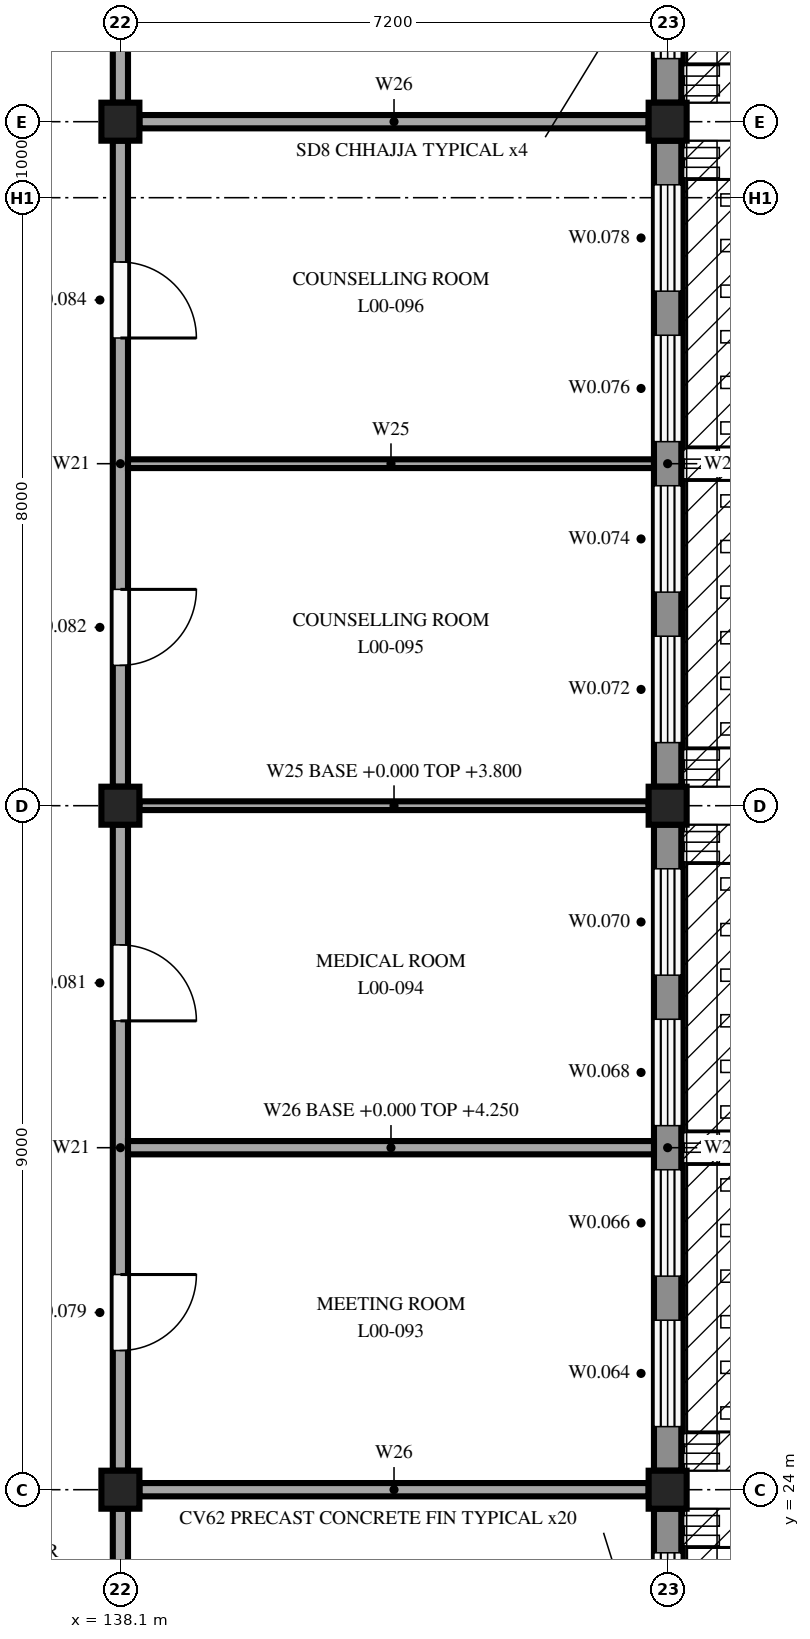
"""IFC4 building model, lengths in metres.
Left out: names, types, materials, properties, quantities, classifications, styles, units other than length and angle.
Written with IfcOpenShell. Run it as: python <this file> out.ifc"""

import sys

from ifc_helpers import new_model, si_unit, direction, frame, frame_2d, origin, origin_2d, place, context, subcontext, project, spatial, rectangle, extrude, element, fill, save


model = new_model("IFC4")
c1 = context("Model", 3, precision=1e-05, world=origin(), true_north=direction((0.0, 1.0)))
c2 = subcontext(c1, "Body", "Model", "MODEL_VIEW")
j1 = project(units=[si_unit("LENGTHUNIT", "METRE"), si_unit("PLANEANGLEUNIT", "RADIAN")], contexts=[c1])
p1 = place(None, origin())
s1 = spatial("IfcSite", under=j1, at=p1, CompositionType="ELEMENT")
p2 = place(p1, origin())
s2 = spatial("IfcBuilding", under=s1, at=p2, CompositionType="ELEMENT")
p3 = place(p2, origin())
s3 = spatial("IfcBuildingStorey", under=s2, at=p3, CompositionType="ELEMENT", Elevation=0.0)
for number, where, z_axis, x_axis in (
    (1, (138.1, 24.0, 0.0), (0.0, 0.0, 1.0), (1.0, 0.0, 0.0)),
    (2, (138.1, 33.0, 0.0), (0.0, 0.0, 1.0), (1.0, 0.0, 0.0)),
    (3, (138.1, 42.0, 0.0), (0.0, 0.0, 1.0), (1.0, 0.0, 0.0)),
    (4, (145.3, 24.0, 0.0), (0.0, 0.0, 1.0), (1.0, 0.0, 0.0)),
    (5, (145.3, 33.0, 0.0), (0.0, 0.0, 1.0), (1.0, 0.0, 0.0)),
    (6, (145.3, 42.0, 0.0), (0.0, 0.0, 1.0), (1.0, 0.0, 0.0)),
):
    element("IfcColumn", number, at=place(p3, frame(where, z_axis=z_axis, x_axis=x_axis)), inside=s3, PredefinedType="COLUMN", context=c2, shape_type="SweptSolid", body=[
        extrude(rectangle(XDim=0.5, YDim=0.5, at=origin_2d()), origin(), (0.0, 0.0, 1.0), 4.25),
    ])
p4 = place(p3, frame((145.3, 23.75, 0.0), z_axis=(0.0, 0.0, 1.0), x_axis=(0.0, -1.0, 0.0)))
e7 = element("IfcWall", 7, at=p4, inside=s3, PredefinedType="STANDARD", context=c2, shape_type="SweptSolid", body=[
    extrude(rectangle(XDim=8.5, YDim=0.36, at=frame_2d((4.25, 0.0))), origin(), (0.0, 0.0, 1.0), 3.75),
])
p5 = place(p4, frame((6.52, 0.0, 0.9)))
e8 = element("IfcOpeningElement", 8, at=p5, cuts=e7, PredefinedType="OPENING", context=c2, shape_type="SweptSolid", body=[
    extrude(rectangle(XDim=1.4, YDim=2.7, at=frame_2d((0.7, 1.35))), frame((0.0, 0.19, 0.0), z_axis=(0.0, -1.0, 0.0), x_axis=(1.0, 0.0, 0.0)), (0.0, 0.0, 1.0), 0.38),
])
p6 = place(p4, frame((4.54, 0.0, 0.9)))
e9 = element("IfcOpeningElement", 9, at=p6, cuts=e7, PredefinedType="OPENING", context=c2, shape_type="SweptSolid", body=[
    extrude(rectangle(XDim=1.4, YDim=2.7, at=frame_2d((0.7, 1.35))), frame((0.0, 0.19, 0.0), z_axis=(0.0, -1.0, 0.0), x_axis=(1.0, 0.0, 0.0)), (0.0, 0.0, 1.0), 0.38),
])
p7 = place(p4, frame((2.56, 0.0, 0.9)))
e10 = element("IfcOpeningElement", 10, at=p7, cuts=e7, PredefinedType="OPENING", context=c2, shape_type="SweptSolid", body=[
    extrude(rectangle(XDim=1.4, YDim=2.7, at=frame_2d((0.7, 1.35))), frame((0.0, 0.19, 0.0), z_axis=(0.0, -1.0, 0.0), x_axis=(1.0, 0.0, 0.0)), (0.0, 0.0, 1.0), 0.38),
])
p8 = place(p4, frame((0.58, 0.0, 0.9)))
e11 = element("IfcOpeningElement", 11, at=p8, cuts=e7, PredefinedType="OPENING", context=c2, shape_type="SweptSolid", body=[
    extrude(rectangle(XDim=1.4, YDim=2.7, at=frame_2d((0.7, 1.35))), frame((0.0, 0.19, 0.0), z_axis=(0.0, -1.0, 0.0), x_axis=(1.0, 0.0, 0.0)), (0.0, 0.0, 1.0), 0.38),
])
p9 = place(p3, frame((145.3, 32.75, 0.0), z_axis=(0.0, 0.0, 1.0), x_axis=(0.0, -1.0, 0.0)))
e12 = element("IfcWall", 12, at=p9, inside=s3, PredefinedType="STANDARD", context=c2, shape_type="SweptSolid", body=[
    extrude(rectangle(XDim=8.5, YDim=0.36, at=frame_2d((4.25, 0.0))), origin(), (0.0, 0.0, 1.0), 3.75),
])
p10 = place(p9, frame((6.52, 0.0, 0.9)))
e13 = element("IfcOpeningElement", 13, at=p10, cuts=e12, PredefinedType="OPENING", context=c2, shape_type="SweptSolid", body=[
    extrude(rectangle(XDim=1.4, YDim=2.7, at=frame_2d((0.7, 1.35))), frame((0.0, 0.19, 0.0), z_axis=(0.0, -1.0, 0.0), x_axis=(1.0, 0.0, 0.0)), (0.0, 0.0, 1.0), 0.38),
])
p11 = place(p9, frame((4.54, 0.0, 0.9)))
e14 = element("IfcOpeningElement", 14, at=p11, cuts=e12, PredefinedType="OPENING", context=c2, shape_type="SweptSolid", body=[
    extrude(rectangle(XDim=1.4, YDim=2.7, at=frame_2d((0.7, 1.35))), frame((0.0, 0.19, 0.0), z_axis=(0.0, -1.0, 0.0), x_axis=(1.0, 0.0, 0.0)), (0.0, 0.0, 1.0), 0.38),
])
p12 = place(p9, frame((2.56, 0.0, 0.6)))
e15 = element("IfcOpeningElement", 15, at=p12, cuts=e12, PredefinedType="OPENING", context=c2, shape_type="SweptSolid", body=[
    extrude(rectangle(XDim=1.4, YDim=3.0, at=frame_2d((0.7, 1.5))), frame((0.0, 0.19, 0.0), z_axis=(0.0, -1.0, 0.0), x_axis=(1.0, 0.0, 0.0)), (0.0, 0.0, 1.0), 0.38),
])
p13 = place(p9, frame((0.58, 0.0, 0.6)))
e16 = element("IfcOpeningElement", 16, at=p13, cuts=e12, PredefinedType="OPENING", context=c2, shape_type="SweptSolid", body=[
    extrude(rectangle(XDim=1.4, YDim=3.0, at=frame_2d((0.7, 1.5))), frame((0.0, 0.19, 0.0), z_axis=(0.0, -1.0, 0.0), x_axis=(1.0, 0.0, 0.0)), (0.0, 0.0, 1.0), 0.38),
])
p14 = place(p3, frame((145.3, 41.75, 0.0), z_axis=(0.0, 0.0, 1.0), x_axis=(0.0, -1.0, 0.0)))
e17 = element("IfcWall", 17, at=p14, inside=s3, PredefinedType="STANDARD", context=c2, shape_type="SweptSolid", body=[
    extrude(rectangle(XDim=8.5, YDim=0.36, at=frame_2d((4.25, 0.0))), origin(), (0.0, 0.0, 1.0), 3.75),
])
p15 = place(p14, frame((6.52, 0.0, 0.9)))
e18 = element("IfcOpeningElement", 18, at=p15, cuts=e17, PredefinedType="OPENING", context=c2, shape_type="SweptSolid", body=[
    extrude(rectangle(XDim=1.4, YDim=2.7, at=frame_2d((0.7, 1.35))), frame((0.0, 0.19, 0.0), z_axis=(0.0, -1.0, 0.0), x_axis=(1.0, 0.0, 0.0)), (0.0, 0.0, 1.0), 0.38),
])
p16 = place(p14, frame((4.54, 0.0, 0.9)))
e19 = element("IfcOpeningElement", 19, at=p16, cuts=e17, PredefinedType="OPENING", context=c2, shape_type="SweptSolid", body=[
    extrude(rectangle(XDim=1.4, YDim=2.7, at=frame_2d((0.7, 1.35))), frame((0.0, 0.19, 0.0), z_axis=(0.0, -1.0, 0.0), x_axis=(1.0, 0.0, 0.0)), (0.0, 0.0, 1.0), 0.38),
])
p17 = place(p14, frame((2.56, 0.0, 0.9)))
e20 = element("IfcOpeningElement", 20, at=p17, cuts=e17, PredefinedType="OPENING", context=c2, shape_type="SweptSolid", body=[
    extrude(rectangle(XDim=1.4, YDim=2.7, at=frame_2d((0.7, 1.35))), frame((0.0, 0.19, 0.0), z_axis=(0.0, -1.0, 0.0), x_axis=(1.0, 0.0, 0.0)), (0.0, 0.0, 1.0), 0.38),
])
p18 = place(p14, frame((0.58, 0.0, 0.9)))
e21 = element("IfcOpeningElement", 21, at=p18, cuts=e17, PredefinedType="OPENING", context=c2, shape_type="SweptSolid", body=[
    extrude(rectangle(XDim=1.4, YDim=2.7, at=frame_2d((0.7, 1.35))), frame((0.0, 0.19, 0.0), z_axis=(0.0, -1.0, 0.0), x_axis=(1.0, 0.0, 0.0)), (0.0, 0.0, 1.0), 0.38),
])
p19 = place(p3, frame((145.3, 50.75, 0.0), z_axis=(0.0, 0.0, 1.0), x_axis=(0.0, -1.0, 0.0)))
e22 = element("IfcWall", 22, at=p19, inside=s3, PredefinedType="STANDARD", context=c2, shape_type="SweptSolid", body=[
    extrude(rectangle(XDim=8.5, YDim=0.36, at=frame_2d((4.25, 0.0))), origin(), (0.0, 0.0, 1.0), 3.75),
])
p20 = place(p19, frame((6.52, 0.0, 0.6)))
e23 = element("IfcOpeningElement", 23, at=p20, cuts=e22, PredefinedType="OPENING", context=c2, shape_type="SweptSolid", body=[
    extrude(rectangle(XDim=1.4, YDim=3.0, at=frame_2d((0.7, 1.5))), frame((0.0, 0.19, 0.0), z_axis=(0.0, -1.0, 0.0), x_axis=(1.0, 0.0, 0.0)), (0.0, 0.0, 1.0), 0.38),
])
p21 = place(p19, frame((4.54, 0.0, 0.6)))
e24 = element("IfcOpeningElement", 24, at=p21, cuts=e22, PredefinedType="OPENING", context=c2, shape_type="SweptSolid", body=[
    extrude(rectangle(XDim=1.4, YDim=3.0, at=frame_2d((0.7, 1.5))), frame((0.0, 0.19, 0.0), z_axis=(0.0, -1.0, 0.0), x_axis=(1.0, 0.0, 0.0)), (0.0, 0.0, 1.0), 0.38),
])
p22 = place(p19, frame((2.56, 0.0, 0.6)))
e25 = element("IfcOpeningElement", 25, at=p22, cuts=e22, PredefinedType="OPENING", context=c2, shape_type="SweptSolid", body=[
    extrude(rectangle(XDim=1.4, YDim=3.0, at=frame_2d((0.7, 1.5))), frame((0.0, 0.19, 0.0), z_axis=(0.0, -1.0, 0.0), x_axis=(1.0, 0.0, 0.0)), (0.0, 0.0, 1.0), 0.38),
])
p23 = place(p19, frame((0.58, 0.0, 0.6)))
e26 = element("IfcOpeningElement", 26, at=p23, cuts=e22, PredefinedType="OPENING", context=c2, shape_type="SweptSolid", body=[
    extrude(rectangle(XDim=1.4, YDim=3.0, at=frame_2d((0.7, 1.5))), frame((0.0, 0.19, 0.0), z_axis=(0.0, -1.0, 0.0), x_axis=(1.0, 0.0, 0.0)), (0.0, 0.0, 1.0), 0.38),
])
p24 = place(p3, frame((138.1, 23.75, 0.0), z_axis=(0.0, 0.0, 1.0), x_axis=(0.0, -1.0, 0.0)))
e27 = element("IfcWall", 27, at=p24, inside=s3, PredefinedType="PARTITIONING", context=c2, shape_type="SweptSolid", body=[
    extrude(rectangle(XDim=8.5, YDim=0.2, at=frame_2d((4.25, 0.0))), origin(), (0.0, 0.0, 1.0), 3.8),
])
p25 = place(p24, frame((3.75, 0.0, 0.0)))
e28 = element("IfcOpeningElement", 28, at=p25, cuts=e27, PredefinedType="OPENING", context=c2, shape_type="SweptSolid", body=[
    extrude(rectangle(XDim=1.0, YDim=2.1, at=frame_2d((0.5, 1.05))), frame((0.0, 0.11, 0.0), z_axis=(0.0, -1.0, 0.0), x_axis=(1.0, 0.0, 0.0)), (0.0, 0.0, 1.0), 0.22),
])
p26 = place(p3, frame((138.1, 32.75, 0.0), z_axis=(0.0, 0.0, 1.0), x_axis=(0.0, -1.0, 0.0)))
e29 = element("IfcWall", 29, at=p26, inside=s3, PredefinedType="PARTITIONING", context=c2, shape_type="SweptSolid", body=[
    extrude(rectangle(XDim=8.5, YDim=0.2, at=frame_2d((4.25, 0.0))), origin(), (0.0, 0.0, 1.0), 3.8),
])
p27 = place(p26, frame((5.919, 0.0, 0.0)))
e30 = element("IfcOpeningElement", 30, at=p27, cuts=e29, PredefinedType="OPENING", context=c2, shape_type="SweptSolid", body=[
    extrude(rectangle(XDim=1.0, YDim=2.1, at=frame_2d((0.5, 1.05))), frame((0.0, 0.11, 0.0), z_axis=(0.0, -1.0, 0.0), x_axis=(1.0, 0.0, 0.0)), (0.0, 0.0, 1.0), 0.22),
])
p28 = place(p26, frame((1.581, 0.0, 0.0)))
e31 = element("IfcOpeningElement", 31, at=p28, cuts=e29, PredefinedType="OPENING", context=c2, shape_type="SweptSolid", body=[
    extrude(rectangle(XDim=1.0, YDim=2.1, at=frame_2d((0.5, 1.05))), frame((0.0, 0.11, 0.0), z_axis=(0.0, -1.0, 0.0), x_axis=(1.0, 0.0, 0.0)), (0.0, 0.0, 1.0), 0.22),
])
p29 = place(p3, frame((138.1, 41.75, 0.0), z_axis=(0.0, 0.0, 1.0), x_axis=(0.0, -1.0, 0.0)))
e32 = element("IfcWall", 32, at=p29, inside=s3, PredefinedType="PARTITIONING", context=c2, shape_type="SweptSolid", body=[
    extrude(rectangle(XDim=8.5, YDim=0.2, at=frame_2d((4.25, 0.0))), origin(), (0.0, 0.0, 1.0), 3.8),
])
p30 = place(p29, frame((5.904, 0.0, 0.0)))
e33 = element("IfcOpeningElement", 33, at=p30, cuts=e32, PredefinedType="OPENING", context=c2, shape_type="SweptSolid", body=[
    extrude(rectangle(XDim=1.0, YDim=2.1, at=frame_2d((0.5, 1.05))), frame((0.0, 0.11, 0.0), z_axis=(0.0, -1.0, 0.0), x_axis=(1.0, 0.0, 0.0)), (0.0, 0.0, 1.0), 0.22),
])
p31 = place(p29, frame((1.596, 0.0, 0.0)))
e34 = element("IfcOpeningElement", 34, at=p31, cuts=e32, PredefinedType="OPENING", context=c2, shape_type="SweptSolid", body=[
    extrude(rectangle(XDim=1.0, YDim=2.1, at=frame_2d((0.5, 1.05))), frame((0.0, 0.11, 0.0), z_axis=(0.0, -1.0, 0.0), x_axis=(1.0, 0.0, 0.0)), (0.0, 0.0, 1.0), 0.22),
])
p32 = place(p3, frame((138.1, 50.75, 0.0), z_axis=(0.0, 0.0, 1.0), x_axis=(0.0, -1.0, 0.0)))
e35 = element("IfcWall", 35, at=p32, inside=s3, PredefinedType="PARTITIONING", context=c2, shape_type="SweptSolid", body=[
    extrude(rectangle(XDim=8.5, YDim=0.2, at=frame_2d((4.25, 0.0))), origin(), (0.0, 0.0, 1.0), 3.8),
])
p33 = place(p32, frame((3.75, 0.0, 0.0)))
e36 = element("IfcOpeningElement", 36, at=p33, cuts=e35, PredefinedType="OPENING", context=c2, shape_type="SweptSolid", body=[
    extrude(rectangle(XDim=1.0, YDim=2.1, at=frame_2d((0.5, 1.05))), frame((0.0, 0.11, 0.0), z_axis=(0.0, -1.0, 0.0), x_axis=(1.0, 0.0, 0.0)), (0.0, 0.0, 1.0), 0.22),
])
p34 = place(p3, frame((138.35, 24.0, 0.0), z_axis=(0.0, 0.0, 1.0), x_axis=(1.0, 0.0, 0.0)))
e37 = element("IfcWall", 37, at=p34, inside=s3, PredefinedType="PARTITIONING", context=c2, shape_type="SweptSolid", body=[
    extrude(rectangle(XDim=6.7, YDim=0.175, at=frame_2d((3.35, 0.0))), origin(), (0.0, 0.0, 1.0), 3.8),
])
p35 = place(p3, frame((138.2, 28.5, 0.0), z_axis=(0.0, 0.0, 1.0), x_axis=(1.0, 0.0, 0.0)))
e38 = element("IfcWall", 38, at=p35, inside=s3, PredefinedType="PARTITIONING", context=c2, shape_type="SweptSolid", body=[
    extrude(rectangle(XDim=6.92, YDim=0.175, at=frame_2d((3.46, 0.0))), origin(), (0.0, 0.0, 1.0), 4.25),
])
p36 = place(p3, frame((138.35, 33.0, 0.0), z_axis=(0.0, 0.0, 1.0), x_axis=(1.0, 0.0, 0.0)))
e39 = element("IfcWall", 39, at=p36, inside=s3, PredefinedType="PARTITIONING", context=c2, shape_type="SweptSolid", body=[
    extrude(rectangle(XDim=6.7, YDim=0.115, at=frame_2d((3.35, 0.0))), origin(), (0.0, 0.0, 1.0), 3.8),
])
p37 = place(p3, frame((138.2, 37.5, 0.0), z_axis=(0.0, 0.0, 1.0), x_axis=(1.0, 0.0, 0.0)))
e40 = element("IfcWall", 40, at=p37, inside=s3, PredefinedType="PARTITIONING", context=c2, shape_type="SweptSolid", body=[
    extrude(rectangle(XDim=6.92, YDim=0.115, at=frame_2d((3.46, 0.0))), origin(), (0.0, 0.0, 1.0), 4.25),
])
p38 = place(p3, frame((138.35, 42.0, 0.0), z_axis=(0.0, 0.0, 1.0), x_axis=(1.0, 0.0, 0.0)))
e41 = element("IfcWall", 41, at=p38, inside=s3, PredefinedType="PARTITIONING", context=c2, shape_type="SweptSolid", body=[
    extrude(rectangle(XDim=6.7, YDim=0.175, at=frame_2d((3.35, 0.0))), origin(), (0.0, 0.0, 1.0), 3.8),
])
p39 = place(p8, origin())
e42 = element("IfcWindow", 42, at=p39, inside=s3, PartitioningType="DOUBLE_PANEL_VERTICAL", PredefinedType="WINDOW", context=c2, shape_type="SweptSolid", body=[
    extrude(rectangle(XDim=1.4, YDim=2.7, at=frame_2d((0.7, 1.35))), frame((0.0, 0.03, 0.0), z_axis=(0.0, -1.0, 0.0), x_axis=(1.0, 0.0, 0.0)), (0.0, 0.0, 1.0), 0.06),
])
fill(e11, e42)
p40 = place(p10, origin())
e43 = element("IfcWindow", 43, at=p40, inside=s3, PartitioningType="DOUBLE_PANEL_VERTICAL", PredefinedType="WINDOW", context=c2, shape_type="SweptSolid", body=[
    extrude(rectangle(XDim=1.4, YDim=2.7, at=frame_2d((0.7, 1.35))), frame((0.0, 0.03, 0.0), z_axis=(0.0, -1.0, 0.0), x_axis=(1.0, 0.0, 0.0)), (0.0, 0.0, 1.0), 0.06),
])
fill(e13, e43)
p41 = place(p11, origin())
e44 = element("IfcWindow", 44, at=p41, inside=s3, PartitioningType="DOUBLE_PANEL_VERTICAL", PredefinedType="WINDOW", context=c2, shape_type="SweptSolid", body=[
    extrude(rectangle(XDim=1.4, YDim=2.7, at=frame_2d((0.7, 1.35))), frame((0.0, 0.03, 0.0), z_axis=(0.0, -1.0, 0.0), x_axis=(1.0, 0.0, 0.0)), (0.0, 0.0, 1.0), 0.06),
])
fill(e14, e44)
p42 = place(p12, origin())
e45 = element("IfcWindow", 45, at=p42, inside=s3, PartitioningType="DOUBLE_PANEL_VERTICAL", PredefinedType="WINDOW", context=c2, shape_type="SweptSolid", body=[
    extrude(rectangle(XDim=1.4, YDim=3.0, at=frame_2d((0.7, 1.5))), frame((0.0, 0.03, 0.0), z_axis=(0.0, -1.0, 0.0), x_axis=(1.0, 0.0, 0.0)), (0.0, 0.0, 1.0), 0.06),
])
fill(e15, e45)
p43 = place(p13, origin())
e46 = element("IfcWindow", 46, at=p43, inside=s3, PartitioningType="DOUBLE_PANEL_VERTICAL", PredefinedType="WINDOW", context=c2, shape_type="SweptSolid", body=[
    extrude(rectangle(XDim=1.4, YDim=3.0, at=frame_2d((0.7, 1.5))), frame((0.0, 0.03, 0.0), z_axis=(0.0, -1.0, 0.0), x_axis=(1.0, 0.0, 0.0)), (0.0, 0.0, 1.0), 0.06),
])
fill(e16, e46)
p44 = place(p15, origin())
e47 = element("IfcWindow", 47, at=p44, inside=s3, PartitioningType="DOUBLE_PANEL_VERTICAL", PredefinedType="WINDOW", context=c2, shape_type="SweptSolid", body=[
    extrude(rectangle(XDim=1.4, YDim=2.7, at=frame_2d((0.7, 1.35))), frame((0.0, 0.03, 0.0), z_axis=(0.0, -1.0, 0.0), x_axis=(1.0, 0.0, 0.0)), (0.0, 0.0, 1.0), 0.06),
])
fill(e18, e47)
p45 = place(p16, origin())
e48 = element("IfcWindow", 48, at=p45, inside=s3, PartitioningType="DOUBLE_PANEL_VERTICAL", PredefinedType="WINDOW", context=c2, shape_type="SweptSolid", body=[
    extrude(rectangle(XDim=1.4, YDim=2.7, at=frame_2d((0.7, 1.35))), frame((0.0, 0.03, 0.0), z_axis=(0.0, -1.0, 0.0), x_axis=(1.0, 0.0, 0.0)), (0.0, 0.0, 1.0), 0.06),
])
fill(e19, e48)
p46 = place(p17, origin())
e49 = element("IfcWindow", 49, at=p46, inside=s3, PartitioningType="DOUBLE_PANEL_VERTICAL", PredefinedType="WINDOW", context=c2, shape_type="SweptSolid", body=[
    extrude(rectangle(XDim=1.4, YDim=2.7, at=frame_2d((0.7, 1.35))), frame((0.0, 0.03, 0.0), z_axis=(0.0, -1.0, 0.0), x_axis=(1.0, 0.0, 0.0)), (0.0, 0.0, 1.0), 0.06),
])
fill(e20, e49)
p47 = place(p18, origin())
e50 = element("IfcWindow", 50, at=p47, inside=s3, PartitioningType="DOUBLE_PANEL_VERTICAL", PredefinedType="WINDOW", context=c2, shape_type="SweptSolid", body=[
    extrude(rectangle(XDim=1.4, YDim=2.7, at=frame_2d((0.7, 1.35))), frame((0.0, 0.03, 0.0), z_axis=(0.0, -1.0, 0.0), x_axis=(1.0, 0.0, 0.0)), (0.0, 0.0, 1.0), 0.06),
])
fill(e21, e50)
p48 = place(p20, origin())
e51 = element("IfcWindow", 51, at=p48, inside=s3, PartitioningType="DOUBLE_PANEL_VERTICAL", PredefinedType="WINDOW", context=c2, shape_type="SweptSolid", body=[
    extrude(rectangle(XDim=1.4, YDim=3.0, at=frame_2d((0.7, 1.5))), frame((0.0, 0.03, 0.0), z_axis=(0.0, -1.0, 0.0), x_axis=(1.0, 0.0, 0.0)), (0.0, 0.0, 1.0), 0.06),
])
fill(e23, e51)
p49 = place(p27, origin())
e52 = element("IfcDoor", 52, at=p49, inside=s3, OperationType="SINGLE_SWING_LEFT", PredefinedType="DOOR", context=c2, shape_type="SweptSolid", body=[
    extrude(rectangle(XDim=1.0, YDim=2.1, at=frame_2d((0.5, 1.05))), frame((0.0, 0.025, 0.0), z_axis=(0.0, -1.0, 0.0), x_axis=(1.0, 0.0, 0.0)), (0.0, 0.0, 1.0), 0.05),
])
fill(e30, e52)
p50 = place(p28, origin())
e53 = element("IfcDoor", 53, at=p50, inside=s3, OperationType="SINGLE_SWING_RIGHT", PredefinedType="DOOR", context=c2, shape_type="SweptSolid", body=[
    extrude(rectangle(XDim=1.0, YDim=2.1, at=frame_2d((0.5, 1.05))), frame((0.0, 0.025, 0.0), z_axis=(0.0, -1.0, 0.0), x_axis=(1.0, 0.0, 0.0)), (0.0, 0.0, 1.0), 0.05),
])
fill(e31, e53)
p51 = place(p30, origin())
e54 = element("IfcDoor", 54, at=p51, inside=s3, OperationType="SINGLE_SWING_LEFT", PredefinedType="DOOR", context=c2, shape_type="SweptSolid", body=[
    extrude(rectangle(XDim=1.0, YDim=2.1, at=frame_2d((0.5, 1.05))), frame((0.0, 0.025, 0.0), z_axis=(0.0, -1.0, 0.0), x_axis=(1.0, 0.0, 0.0)), (0.0, 0.0, 1.0), 0.05),
])
fill(e33, e54)
p52 = place(p31, origin())
e55 = element("IfcDoor", 55, at=p52, inside=s3, OperationType="SINGLE_SWING_RIGHT", PredefinedType="DOOR", context=c2, shape_type="SweptSolid", body=[
    extrude(rectangle(XDim=1.0, YDim=2.1, at=frame_2d((0.5, 1.05))), frame((0.0, 0.025, 0.0), z_axis=(0.0, -1.0, 0.0), x_axis=(1.0, 0.0, 0.0)), (0.0, 0.0, 1.0), 0.05),
])
fill(e34, e55)
save(model, sys.argv[1])
